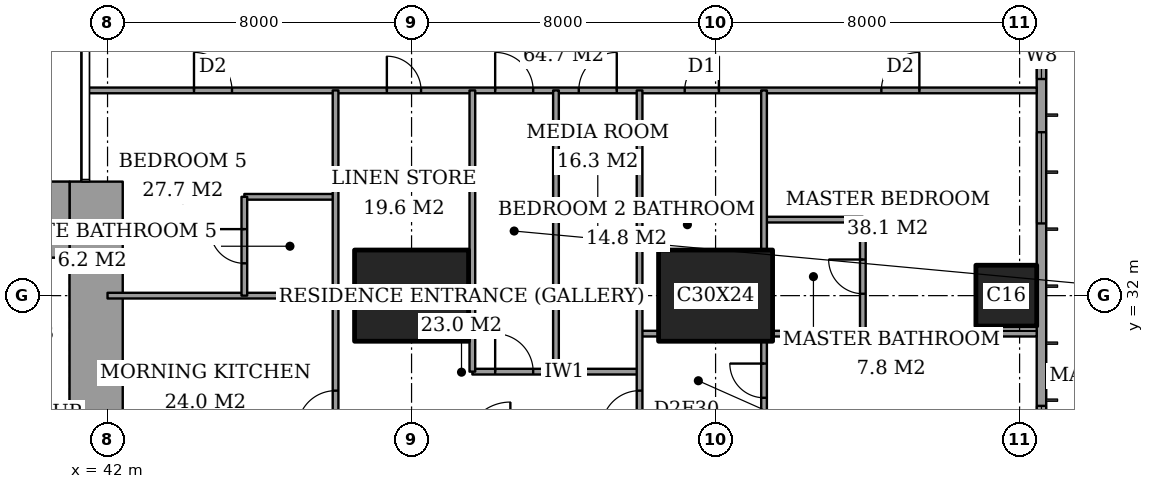
"""IFC4 building model, lengths in metres.
Left out: names, types, materials, properties, quantities, classifications, styles, units other than length and angle.
Written with IfcOpenShell. Run it as: python <this file> out.ifc"""

import sys

from ifc_helpers import new_model, si_unit, direction, frame, frame_2d, origin, origin_2d, place, context, subcontext, project, spatial, rectangle, extrude, element, fill, save


model = new_model("IFC4")
c1 = context("Model", 3, precision=1e-05, world=origin(), true_north=direction((0.0, 1.0)))
c2 = subcontext(c1, "Body", "Model", "MODEL_VIEW")
j1 = project(units=[si_unit("LENGTHUNIT", "METRE"), si_unit("PLANEANGLEUNIT", "RADIAN")], contexts=[c1])
p1 = place(None, origin())
s1 = spatial("IfcSite", under=j1, at=p1, CompositionType="ELEMENT")
p2 = place(p1, origin())
s2 = spatial("IfcBuilding", under=s1, at=p2, CompositionType="ELEMENT")
p3 = place(p2, frame((0.0, 0.0, 234.0)))
s3 = spatial("IfcBuildingStorey", under=s2, at=p3, CompositionType="ELEMENT", Elevation=234.0)
for number, where, z_axis, x_axis in (
    (1, (50.0, 32.0, 0.0), (0.0, 0.0, 1.0), (1.0, 0.0, 0.0)),
    (2, (58.0, 32.0, 0.0), (0.0, 0.0, 1.0), (1.0, 0.0, 0.0)),
):
    element("IfcColumn", number, at=place(p3, frame(where, z_axis=z_axis, x_axis=x_axis)), inside=s3, PredefinedType="COLUMN", context=c2, shape_type="SweptSolid", body=[
        extrude(rectangle(XDim=3.0, YDim=2.4, at=origin_2d()), origin(), (0.0, 0.0, 1.0), 3.6),
    ])
p4 = place(p3, frame((65.65, 32.0, 0.0), z_axis=(0.0, 0.0, 1.0), x_axis=(1.0, 0.0, 0.0)))
e3 = element("IfcColumn", 3, at=p4, inside=s3, PredefinedType="COLUMN", context=c2, shape_type="SweptSolid", body=[
    extrude(rectangle(XDim=1.6, YDim=1.6, at=origin_2d()), origin(), (0.0, 0.0, 1.0), 3.6),
])
p5 = place(p3, frame((37.85, 34.0, 0.0), z_axis=(0.0, 0.0, 1.0), x_axis=(1.0, 0.0, 0.0)))
e4 = element("IfcWall", 4, at=p5, inside=s3, PredefinedType="SHEAR", context=c2, shape_type="SweptSolid", body=[
    extrude(rectangle(XDim=3.15, YDim=2.0, at=frame_2d((1.575, 0.0))), origin(), (0.0, 0.0, 1.0), 3.6),
])
p6 = place(p3, frame((41.7, 24.85, 0.0), z_axis=(0.0, 0.0, 1.0), x_axis=(0.0, 1.0, 0.0)))
e5 = element("IfcWall", 5, at=p6, inside=s3, PredefinedType="SHEAR", context=c2, shape_type="SweptSolid", body=[
    extrude(rectangle(XDim=10.15, YDim=1.4, at=frame_2d((5.075, 0.0))), origin(), (0.0, 0.0, 1.0), 3.6),
])
p7 = place(p3, frame((66.575, 3.175, 0.0), z_axis=(0.0, 0.0, 1.0), x_axis=(0.0, 1.0, 0.0)))
e6 = element("IfcWall", 6, at=p7, inside=s3, PredefinedType="SOLIDWALL", context=c2, shape_type="SweptSolid", body=[
    extrude(rectangle(XDim=41.65, YDim=0.25, at=frame_2d((20.825, 0.0))), origin(), (0.0, 0.0, 1.0), 3.6),
])
p8 = place(p7, frame((0.875, 0.0, 0.6)))
e7 = element("IfcOpeningElement", 7, at=p8, cuts=e6, PredefinedType="OPENING", context=c2, shape_type="SweptSolid", body=[
    extrude(rectangle(XDim=2.4, YDim=2.0, at=frame_2d((1.2, 1.0))), frame((0.0, 0.135, 0.0), z_axis=(0.0, -1.0, 0.0), x_axis=(1.0, 0.0, 0.0)), (0.0, 0.0, 1.0), 0.27),
])
p9 = place(p7, frame((6.225, 0.0, 0.6)))
e8 = element("IfcOpeningElement", 8, at=p9, cuts=e6, PredefinedType="OPENING", context=c2, shape_type="SweptSolid", body=[
    extrude(rectangle(XDim=1.2, YDim=2.0, at=frame_2d((0.6, 1.0))), frame((0.0, 0.135, 0.0), z_axis=(0.0, -1.0, 0.0), x_axis=(1.0, 0.0, 0.0)), (0.0, 0.0, 1.0), 0.27),
])
p10 = place(p7, frame((8.725, 0.0, 0.6)))
e9 = element("IfcOpeningElement", 9, at=p10, cuts=e6, PredefinedType="OPENING", context=c2, shape_type="SweptSolid", body=[
    extrude(rectangle(XDim=2.4, YDim=2.0, at=frame_2d((1.2, 1.0))), frame((0.0, 0.135, 0.0), z_axis=(0.0, -1.0, 0.0), x_axis=(1.0, 0.0, 0.0)), (0.0, 0.0, 1.0), 0.27),
])
p11 = place(p7, frame((15.725, 0.0, 0.6)))
e10 = element("IfcOpeningElement", 10, at=p11, cuts=e6, PredefinedType="OPENING", context=c2, shape_type="SweptSolid", body=[
    extrude(rectangle(XDim=2.4, YDim=2.0, at=frame_2d((1.2, 1.0))), frame((0.0, 0.135, 0.0), z_axis=(0.0, -1.0, 0.0), x_axis=(1.0, 0.0, 0.0)), (0.0, 0.0, 1.0), 0.27),
])
p12 = place(p7, frame((23.525, 0.0, 0.6)))
e11 = element("IfcOpeningElement", 11, at=p12, cuts=e6, PredefinedType="OPENING", context=c2, shape_type="SweptSolid", body=[
    extrude(rectangle(XDim=2.4, YDim=2.0, at=frame_2d((1.2, 1.0))), frame((0.0, 0.135, 0.0), z_axis=(0.0, -1.0, 0.0), x_axis=(1.0, 0.0, 0.0)), (0.0, 0.0, 1.0), 0.27),
])
p13 = place(p7, frame((30.725, 0.0, 0.6)))
e12 = element("IfcOpeningElement", 12, at=p13, cuts=e6, PredefinedType="OPENING", context=c2, shape_type="SweptSolid", body=[
    extrude(rectangle(XDim=2.4, YDim=2.0, at=frame_2d((1.2, 1.0))), frame((0.0, 0.135, 0.0), z_axis=(0.0, -1.0, 0.0), x_axis=(1.0, 0.0, 0.0)), (0.0, 0.0, 1.0), 0.27),
])
p14 = place(p7, frame((34.525, 0.0, 0.6)))
e13 = element("IfcOpeningElement", 13, at=p14, cuts=e6, PredefinedType="OPENING", context=c2, shape_type="SweptSolid", body=[
    extrude(rectangle(XDim=1.2, YDim=2.0, at=frame_2d((0.6, 1.0))), frame((0.0, 0.135, 0.0), z_axis=(0.0, -1.0, 0.0), x_axis=(1.0, 0.0, 0.0)), (0.0, 0.0, 1.0), 0.27),
])
p15 = place(p7, frame((38.375, 0.0, 0.6)))
e14 = element("IfcOpeningElement", 14, at=p15, cuts=e6, PredefinedType="OPENING", context=c2, shape_type="SweptSolid", body=[
    extrude(rectangle(XDim=2.4, YDim=2.0, at=frame_2d((1.2, 1.0))), frame((0.0, 0.135, 0.0), z_axis=(0.0, -1.0, 0.0), x_axis=(1.0, 0.0, 0.0)), (0.0, 0.0, 1.0), 0.27),
])
p16 = place(p3, frame((51.6, 30.0, 0.0), z_axis=(0.0, 0.0, 1.0), x_axis=(1.0, 0.0, 0.0)))
e15 = element("IfcWall", 15, at=p16, inside=s3, PredefinedType="PARTITIONING", context=c2, shape_type="SweptSolid", body=[
    extrude(rectangle(XDim=4.4, YDim=0.15, at=frame_2d((2.2, 0.0))), origin(), (0.0, 0.0, 1.0), 3.35),
])
p17 = place(p16, frame((0.6, 0.0, 0.0)))
e16 = element("IfcOpeningElement", 16, at=p17, cuts=e15, PredefinedType="OPENING", context=c2, shape_type="SweptSolid", body=[
    extrude(rectangle(XDim=1.0, YDim=2.1, at=frame_2d((0.5, 1.05))), frame((0.0, 0.085, 0.0), z_axis=(0.0, -1.0, 0.0), x_axis=(1.0, 0.0, 0.0)), (0.0, 0.0, 1.0), 0.17),
])
p18 = place(p3, frame((56.0, 31.0, 0.0), z_axis=(0.0, 0.0, 1.0), x_axis=(1.0, 0.0, 0.0)))
e17 = element("IfcWall", 17, at=p18, inside=s3, PredefinedType="PARTITIONING", context=c2, shape_type="SweptSolid", body=[
    extrude(rectangle(XDim=0.5, YDim=0.15, at=frame_2d((0.25, 0.0))), origin(), (0.0, 0.0, 1.0), 3.35),
])
p19 = place(p3, frame((59.5, 31.0, 0.0), z_axis=(0.0, 0.0, 1.0), x_axis=(1.0, 0.0, 0.0)))
e18 = element("IfcWall", 18, at=p19, inside=s3, PredefinedType="PARTITIONING", context=c2, shape_type="SweptSolid", body=[
    extrude(rectangle(XDim=6.95, YDim=0.15, at=frame_2d((3.475, 0.0))), origin(), (0.0, 0.0, 1.0), 3.35),
])
p20 = place(p3, frame((48.0, 31.95, 0.0), z_axis=(0.0, 0.0, 1.0), x_axis=(1.0, 0.0, 0.0)))
e19 = element("IfcWall", 19, at=p20, inside=s3, PredefinedType="PARTITIONING", context=c2, shape_type="SweptSolid", body=[
    extrude(rectangle(XDim=0.5, YDim=0.15, at=frame_2d((0.25, 0.0))), origin(), (0.0, 0.0, 1.0), 2.634),
])
p21 = place(p3, frame((42.0, 32.0, 0.0), z_axis=(0.0, 0.0, 1.0), x_axis=(1.0, 0.0, 0.0)))
e20 = element("IfcWall", 20, at=p21, inside=s3, PredefinedType="PARTITIONING", context=c2, shape_type="SweptSolid", body=[
    extrude(rectangle(XDim=6.0, YDim=0.15, at=frame_2d((3.0, 0.0))), origin(), (0.0, 0.0, 1.0), 2.634),
])
p22 = place(p3, frame((59.275, 34.0, 0.0), z_axis=(0.0, 0.0, 1.0), x_axis=(1.0, 0.0, 0.0)))
e21 = element("IfcWall", 21, at=p22, inside=s3, PredefinedType="PARTITIONING", context=c2, shape_type="SweptSolid", body=[
    extrude(rectangle(XDim=2.6, YDim=0.15, at=frame_2d((1.3, 0.0))), origin(), (0.0, 0.0, 1.0), 3.35),
])
p23 = place(p3, frame((45.6, 34.6, 0.0), z_axis=(0.0, 0.0, 1.0), x_axis=(1.0, 0.0, 0.0)))
e22 = element("IfcWall", 22, at=p23, inside=s3, PredefinedType="PARTITIONING", context=c2, shape_type="SweptSolid", body=[
    extrude(rectangle(XDim=2.4, YDim=0.15, at=frame_2d((1.2, 0.0))), origin(), (0.0, 0.0, 1.0), 3.35),
])
p24 = place(p3, frame((41.439, 37.4, 0.0), z_axis=(0.0, 0.0, 1.0), x_axis=(1.0, 0.0, 0.0)))
e23 = element("IfcWall", 23, at=p24, inside=s3, PredefinedType="PARTITIONING", context=c2, shape_type="SweptSolid", body=[
    extrude(rectangle(XDim=25.011, YDim=0.15, at=frame_2d((12.505, 0.0))), origin(), (0.0, 0.0, 1.0), 3.35),
])
p25 = place(p24, frame((10.761, 0.0, 0.0)))
e24 = element("IfcOpeningElement", 24, at=p25, cuts=e23, PredefinedType="OPENING", context=c2, shape_type="SweptSolid", body=[
    extrude(rectangle(XDim=1.0, YDim=2.1, at=frame_2d((0.5, 1.05))), frame((0.0, 0.085, 0.0), z_axis=(0.0, -1.0, 0.0), x_axis=(1.0, 0.0, 0.0)), (0.0, 0.0, 1.0), 0.17),
])
p26 = place(p24, frame((20.924, 0.0, 0.0)))
e25 = element("IfcOpeningElement", 25, at=p26, cuts=e23, PredefinedType="OPENING", context=c2, shape_type="SweptSolid", body=[
    extrude(rectangle(XDim=1.0, YDim=2.1, at=frame_2d((0.5, 1.05))), frame((0.0, 0.085, 0.0), z_axis=(0.0, -1.0, 0.0), x_axis=(1.0, 0.0, 0.0)), (0.0, 0.0, 1.0), 0.17),
])
p27 = place(p24, frame((15.749, 0.0, 0.0)))
e26 = element("IfcOpeningElement", 26, at=p27, cuts=e23, PredefinedType="OPENING", context=c2, shape_type="SweptSolid", body=[
    extrude(rectangle(XDim=0.9, YDim=2.1, at=frame_2d((0.45, 1.05))), frame((0.0, 0.085, 0.0), z_axis=(0.0, -1.0, 0.0), x_axis=(1.0, 0.0, 0.0)), (0.0, 0.0, 1.0), 0.17),
])
p28 = place(p24, frame((12.961, 0.0, 0.0)))
e27 = element("IfcOpeningElement", 27, at=p28, cuts=e23, PredefinedType="OPENING", context=c2, shape_type="SweptSolid", body=[
    extrude(rectangle(XDim=1.0, YDim=2.1, at=frame_2d((0.5, 1.05))), frame((0.0, 0.085, 0.0), z_axis=(0.0, -1.0, 0.0), x_axis=(1.0, 0.0, 0.0)), (0.0, 0.0, 1.0), 0.17),
])
p29 = place(p24, frame((7.911, 0.0, 0.0)))
e28 = element("IfcOpeningElement", 28, at=p29, cuts=e23, PredefinedType="OPENING", context=c2, shape_type="SweptSolid", body=[
    extrude(rectangle(XDim=0.9, YDim=2.1, at=frame_2d((0.45, 1.05))), frame((0.0, 0.085, 0.0), z_axis=(0.0, -1.0, 0.0), x_axis=(1.0, 0.0, 0.0)), (0.0, 0.0, 1.0), 0.17),
])
p30 = place(p24, frame((2.836, 0.0, 0.0)))
e29 = element("IfcOpeningElement", 29, at=p30, cuts=e23, PredefinedType="OPENING", context=c2, shape_type="SweptSolid", body=[
    extrude(rectangle(XDim=1.0, YDim=2.1, at=frame_2d((0.5, 1.05))), frame((0.0, 0.085, 0.0), z_axis=(0.0, -1.0, 0.0), x_axis=(1.0, 0.0, 0.0)), (0.0, 0.0, 1.0), 0.17),
])
p31 = place(p3, frame((45.6, 32.0, 0.0), z_axis=(0.0, 0.0, 1.0), x_axis=(0.0, 1.0, 0.0)))
e30 = element("IfcWall", 30, at=p31, inside=s3, PredefinedType="PARTITIONING", context=c2, shape_type="SweptSolid", body=[
    extrude(rectangle(XDim=2.6, YDim=0.15, at=frame_2d((1.3, 0.0))), origin(), (0.0, 0.0, 1.0), 3.35),
])
p32 = place(p31, frame((0.85, 0.0, 0.0)))
e31 = element("IfcOpeningElement", 31, at=p32, cuts=e30, PredefinedType="OPENING", context=c2, shape_type="SweptSolid", body=[
    extrude(rectangle(XDim=0.9, YDim=2.1, at=frame_2d((0.45, 1.05))), frame((0.0, 0.085, 0.0), z_axis=(0.0, -1.0, 0.0), x_axis=(1.0, 0.0, 0.0)), (0.0, 0.0, 1.0), 0.17),
])
p33 = place(p3, frame((48.0, 28.0, 0.0), z_axis=(0.0, 0.0, 1.0), x_axis=(0.0, 1.0, 0.0)))
e32 = element("IfcWall", 32, at=p33, inside=s3, PredefinedType="PARTITIONING", context=c2, shape_type="SweptSolid", body=[
    extrude(rectangle(XDim=9.4, YDim=0.15, at=frame_2d((4.7, 0.0))), origin(), (0.0, 0.0, 1.0), 3.35),
])
p34 = place(p33, frame((0.5, 0.0, 0.0)))
e33 = element("IfcOpeningElement", 33, at=p34, cuts=e32, PredefinedType="OPENING", context=c2, shape_type="SweptSolid", body=[
    extrude(rectangle(XDim=1.0, YDim=2.1, at=frame_2d((0.5, 1.05))), frame((0.0, 0.085, 0.0), z_axis=(0.0, -1.0, 0.0), x_axis=(1.0, 0.0, 0.0)), (0.0, 0.0, 1.0), 0.17),
])
for number, where, z_axis, x_axis in (
    (34, (51.6, 30.0, 0.0), (0.0, 0.0, 1.0), (0.0, 1.0, 0.0)),
    (35, (53.8, 30.0, 0.0), (0.0, 0.0, 1.0), (0.0, 1.0, 0.0)),
):
    element("IfcWall", number, at=place(p3, frame(where, z_axis=z_axis, x_axis=x_axis)), inside=s3, PredefinedType="PARTITIONING", context=c2, shape_type="SweptSolid", body=[
        extrude(rectangle(XDim=7.4, YDim=0.15, at=frame_2d((3.7, 0.0))), origin(), (0.0, 0.0, 1.0), 3.35),
    ])
p35 = place(p3, frame((56.0, 28.0, 0.0), z_axis=(0.0, 0.0, 1.0), x_axis=(0.0, 1.0, 0.0)))
e36 = element("IfcWall", 36, at=p35, inside=s3, PredefinedType="PARTITIONING", context=c2, shape_type="SweptSolid", body=[
    extrude(rectangle(XDim=9.4, YDim=0.15, at=frame_2d((4.7, 0.0))), origin(), (0.0, 0.0, 1.0), 3.35),
])
p36 = place(p35, frame((0.5, 0.0, 0.0)))
e37 = element("IfcOpeningElement", 37, at=p36, cuts=e36, PredefinedType="OPENING", context=c2, shape_type="SweptSolid", body=[
    extrude(rectangle(XDim=1.0, YDim=2.1, at=frame_2d((0.5, 1.05))), frame((0.0, 0.085, 0.0), z_axis=(0.0, -1.0, 0.0), x_axis=(1.0, 0.0, 0.0)), (0.0, 0.0, 1.0), 0.17),
])
p37 = place(p3, frame((59.275, 28.35, 0.0), z_axis=(0.0, 0.0, 1.0), x_axis=(0.0, 1.0, 0.0)))
e38 = element("IfcWall", 38, at=p37, inside=s3, PredefinedType="PARTITIONING", context=c2, shape_type="SweptSolid", body=[
    extrude(rectangle(XDim=2.45, YDim=0.15, at=frame_2d((1.225, 0.0))), origin(), (0.0, 0.0, 1.0), 3.35),
])
p38 = place(p37, frame((0.962, 0.0, 0.0)))
e39 = element("IfcOpeningElement", 39, at=p38, cuts=e38, PredefinedType="OPENING", context=c2, shape_type="SweptSolid", body=[
    extrude(rectangle(XDim=0.9, YDim=2.1, at=frame_2d((0.45, 1.05))), frame((0.0, 0.085, 0.0), z_axis=(0.0, -1.0, 0.0), x_axis=(1.0, 0.0, 0.0)), (0.0, 0.0, 1.0), 0.17),
])
p39 = place(p3, frame((59.275, 33.2, 0.0), z_axis=(0.0, 0.0, 1.0), x_axis=(0.0, 1.0, 0.0)))
e40 = element("IfcWall", 40, at=p39, inside=s3, PredefinedType="PARTITIONING", context=c2, shape_type="SweptSolid", body=[
    extrude(rectangle(XDim=4.2, YDim=0.15, at=frame_2d((2.1, 0.0))), origin(), (0.0, 0.0, 1.0), 3.35),
])
p40 = place(p3, frame((61.875, 31.0, 0.0), z_axis=(0.0, 0.0, 1.0), x_axis=(0.0, 1.0, 0.0)))
e41 = element("IfcWall", 41, at=p40, inside=s3, PredefinedType="PARTITIONING", context=c2, shape_type="SweptSolid", body=[
    extrude(rectangle(XDim=3.0, YDim=0.15, at=frame_2d((1.5, 0.0))), origin(), (0.0, 0.0, 1.0), 3.35),
])
p41 = place(p40, frame((1.05, 0.0, 0.0)))
e42 = element("IfcOpeningElement", 42, at=p41, cuts=e41, PredefinedType="OPENING", context=c2, shape_type="SweptSolid", body=[
    extrude(rectangle(XDim=0.9, YDim=2.1, at=frame_2d((0.45, 1.05))), frame((0.0, 0.085, 0.0), z_axis=(0.0, -1.0, 0.0), x_axis=(1.0, 0.0, 0.0)), (0.0, 0.0, 1.0), 0.17),
])
p42 = place(p12, origin())
e43 = element("IfcWindow", 43, at=p42, inside=s3, PartitioningType="SINGLE_PANEL", PredefinedType="WINDOW", context=c2, shape_type="SweptSolid", body=[
    extrude(rectangle(XDim=2.4, YDim=2.0, at=frame_2d((1.2, 1.0))), frame((0.0, 0.03, 0.0), z_axis=(0.0, -1.0, 0.0), x_axis=(1.0, 0.0, 0.0)), (0.0, 0.0, 1.0), 0.06),
])
fill(e11, e43)
p43 = place(p13, origin())
e44 = element("IfcWindow", 44, at=p43, inside=s3, PartitioningType="SINGLE_PANEL", PredefinedType="WINDOW", context=c2, shape_type="SweptSolid", body=[
    extrude(rectangle(XDim=2.4, YDim=2.0, at=frame_2d((1.2, 1.0))), frame((0.0, 0.03, 0.0), z_axis=(0.0, -1.0, 0.0), x_axis=(1.0, 0.0, 0.0)), (0.0, 0.0, 1.0), 0.06),
])
fill(e12, e44)
p44 = place(p14, origin())
e45 = element("IfcWindow", 45, at=p44, inside=s3, PartitioningType="SINGLE_PANEL", PredefinedType="WINDOW", context=c2, shape_type="SweptSolid", body=[
    extrude(rectangle(XDim=1.2, YDim=2.0, at=frame_2d((0.6, 1.0))), frame((0.0, 0.03, 0.0), z_axis=(0.0, -1.0, 0.0), x_axis=(1.0, 0.0, 0.0)), (0.0, 0.0, 1.0), 0.06),
])
fill(e13, e45)
p45 = place(p25, origin())
e46 = element("IfcDoor", 46, at=p45, inside=s3, OperationType="SINGLE_SWING_RIGHT", PredefinedType="DOOR", context=c2, shape_type="SweptSolid", body=[
    extrude(rectangle(XDim=1.0, YDim=2.1, at=frame_2d((0.5, 1.05))), frame((0.0, 0.025, 0.0), z_axis=(0.0, -1.0, 0.0), x_axis=(1.0, 0.0, 0.0)), (0.0, 0.0, 1.0), 0.05),
])
fill(e24, e46)
p46 = place(p41, origin())
e47 = element("IfcDoor", 47, at=p46, inside=s3, OperationType="SINGLE_SWING_LEFT", PredefinedType="DOOR", context=c2, shape_type="SweptSolid", body=[
    extrude(rectangle(XDim=0.9, YDim=2.1, at=frame_2d((0.45, 1.05))), frame((0.0, 0.025, 0.0), z_axis=(0.0, -1.0, 0.0), x_axis=(1.0, 0.0, 0.0)), (0.0, 0.0, 1.0), 0.05),
])
fill(e42, e47)
p47 = place(p26, origin())
e48 = element("IfcDoor", 48, at=p47, inside=s3, OperationType="SINGLE_SWING_LEFT", PredefinedType="DOOR", context=c2, shape_type="SweptSolid", body=[
    extrude(rectangle(XDim=1.0, YDim=2.1, at=frame_2d((0.5, 1.05))), frame((0.0, 0.025, 0.0), z_axis=(0.0, -1.0, 0.0), x_axis=(1.0, 0.0, 0.0)), (0.0, 0.0, 1.0), 0.05),
])
fill(e25, e48)
p48 = place(p38, origin())
e49 = element("IfcDoor", 49, at=p48, inside=s3, OperationType="SINGLE_SWING_LEFT", PredefinedType="DOOR", context=c2, shape_type="SweptSolid", body=[
    extrude(rectangle(XDim=0.9, YDim=2.1, at=frame_2d((0.45, 1.05))), frame((0.0, 0.025, 0.0), z_axis=(0.0, -1.0, 0.0), x_axis=(1.0, 0.0, 0.0)), (0.0, 0.0, 1.0), 0.05),
])
fill(e39, e49)
p49 = place(p27, origin())
e50 = element("IfcDoor", 50, at=p49, inside=s3, OperationType="SINGLE_SWING_LEFT", PredefinedType="DOOR", context=c2, shape_type="SweptSolid", body=[
    extrude(rectangle(XDim=0.9, YDim=2.1, at=frame_2d((0.45, 1.05))), frame((0.0, 0.025, 0.0), z_axis=(0.0, -1.0, 0.0), x_axis=(1.0, 0.0, 0.0)), (0.0, 0.0, 1.0), 0.05),
])
fill(e26, e50)
p50 = place(p36, origin())
e51 = element("IfcDoor", 51, at=p50, inside=s3, OperationType="SINGLE_SWING_RIGHT", PredefinedType="DOOR", context=c2, shape_type="SweptSolid", body=[
    extrude(rectangle(XDim=1.0, YDim=2.1, at=frame_2d((0.5, 1.05))), frame((0.0, 0.025, 0.0), z_axis=(0.0, -1.0, 0.0), x_axis=(1.0, 0.0, 0.0)), (0.0, 0.0, 1.0), 0.05),
])
fill(e37, e51)
p51 = place(p28, origin())
e52 = element("IfcDoor", 52, at=p51, inside=s3, OperationType="SINGLE_SWING_LEFT", PredefinedType="DOOR", context=c2, shape_type="SweptSolid", body=[
    extrude(rectangle(XDim=1.0, YDim=2.1, at=frame_2d((0.5, 1.05))), frame((0.0, 0.025, 0.0), z_axis=(0.0, -1.0, 0.0), x_axis=(1.0, 0.0, 0.0)), (0.0, 0.0, 1.0), 0.05),
])
fill(e27, e52)
p52 = place(p17, origin())
e53 = element("IfcDoor", 53, at=p52, inside=s3, OperationType="SINGLE_SWING_RIGHT", PredefinedType="DOOR", context=c2, shape_type="SweptSolid", body=[
    extrude(rectangle(XDim=1.0, YDim=2.1, at=frame_2d((0.5, 1.05))), frame((0.0, 0.025, 0.0), z_axis=(0.0, -1.0, 0.0), x_axis=(1.0, 0.0, 0.0)), (0.0, 0.0, 1.0), 0.05),
])
fill(e16, e53)
p53 = place(p29, origin())
e54 = element("IfcDoor", 54, at=p53, inside=s3, OperationType="SINGLE_SWING_RIGHT", PredefinedType="DOOR", context=c2, shape_type="SweptSolid", body=[
    extrude(rectangle(XDim=0.9, YDim=2.1, at=frame_2d((0.45, 1.05))), frame((0.0, 0.025, 0.0), z_axis=(0.0, -1.0, 0.0), x_axis=(1.0, 0.0, 0.0)), (0.0, 0.0, 1.0), 0.05),
])
fill(e28, e54)
p54 = place(p32, origin())
e55 = element("IfcDoor", 55, at=p54, inside=s3, OperationType="SINGLE_SWING_LEFT", PredefinedType="DOOR", context=c2, shape_type="SweptSolid", body=[
    extrude(rectangle(XDim=0.9, YDim=2.1, at=frame_2d((0.45, 1.05))), frame((0.0, 0.025, 0.0), z_axis=(0.0, -1.0, 0.0), x_axis=(1.0, 0.0, 0.0)), (0.0, 0.0, 1.0), 0.05),
])
fill(e31, e55)
p55 = place(p30, origin())
e56 = element("IfcDoor", 56, at=p55, inside=s3, OperationType="SINGLE_SWING_RIGHT", PredefinedType="DOOR", context=c2, shape_type="SweptSolid", body=[
    extrude(rectangle(XDim=1.0, YDim=2.1, at=frame_2d((0.5, 1.05))), frame((0.0, 0.025, 0.0), z_axis=(0.0, -1.0, 0.0), x_axis=(1.0, 0.0, 0.0)), (0.0, 0.0, 1.0), 0.05),
])
fill(e29, e56)
p56 = place(p34, origin())
e57 = element("IfcDoor", 57, at=p56, inside=s3, OperationType="SINGLE_SWING_RIGHT", PredefinedType="DOOR", context=c2, shape_type="SweptSolid", body=[
    extrude(rectangle(XDim=1.0, YDim=2.1, at=frame_2d((0.5, 1.05))), frame((0.0, 0.025, 0.0), z_axis=(0.0, -1.0, 0.0), x_axis=(1.0, 0.0, 0.0)), (0.0, 0.0, 1.0), 0.05),
])
fill(e33, e57)
save(model, sys.argv[1])
